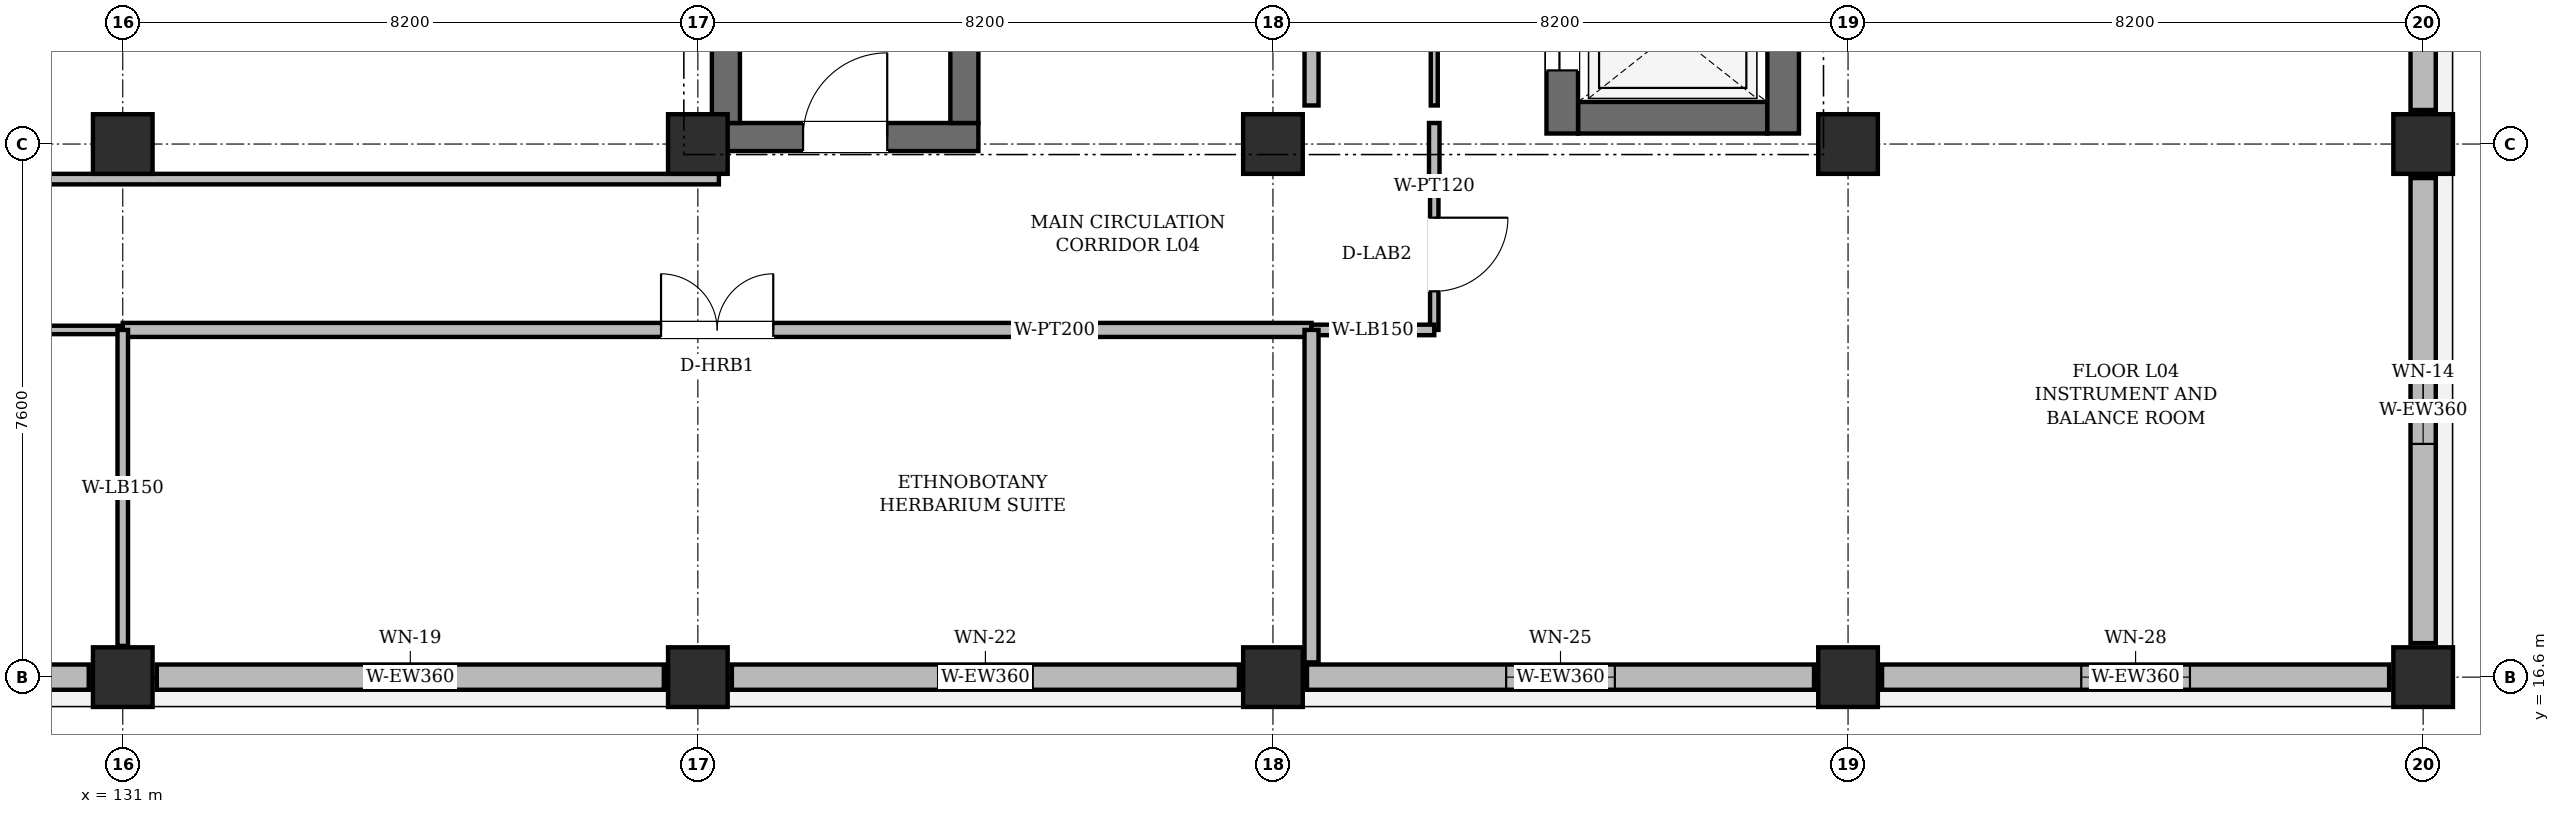
"""IFC4 building model, lengths in metres.
Left out: names, types, materials, properties, quantities, classifications, styles, units other than length and angle.
Written with IfcOpenShell. Run it as: python <this file> out.ifc"""

import sys

from ifc_helpers import new_model, si_unit, direction, frame, frame_2d, origin, origin_2d, place, context, subcontext, project, spatial, rectangle, extrude, element, fill, save


model = new_model("IFC4")
c1 = context("Model", 3, precision=1e-05, world=origin(), true_north=direction((0.0, 1.0)))
c2 = subcontext(c1, "Body", "Model", "MODEL_VIEW")
j1 = project(units=[si_unit("LENGTHUNIT", "METRE"), si_unit("PLANEANGLEUNIT", "RADIAN")], contexts=[c1])
p1 = place(None, origin())
s1 = spatial("IfcSite", under=j1, at=p1, CompositionType="ELEMENT")
p2 = place(p1, origin())
s2 = spatial("IfcBuilding", under=s1, at=p2, CompositionType="ELEMENT")
p3 = place(p2, frame((0.0, 0.0, 19.8)))
s3 = spatial("IfcBuildingStorey", under=s2, at=p3, CompositionType="ELEMENT", Elevation=19.8)
for number, where, z_axis, x_axis in (
    (1, (131.0, 16.6, 0.0), (0.0, 0.0, 1.0), (1.0, 0.0, 0.0)),
    (2, (131.0, 24.2, 0.0), (0.0, 0.0, 1.0), (1.0, 0.0, 0.0)),
    (3, (139.2, 16.6, 0.0), (0.0, 0.0, 1.0), (1.0, 0.0, 0.0)),
    (4, (139.2, 24.2, 0.0), (0.0, 0.0, 1.0), (1.0, 0.0, 0.0)),
    (5, (147.4, 16.6, 0.0), (0.0, 0.0, 1.0), (1.0, 0.0, 0.0)),
    (6, (147.4, 24.2, 0.0), (0.0, 0.0, 1.0), (1.0, 0.0, 0.0)),
    (7, (155.6, 16.6, 0.0), (0.0, 0.0, 1.0), (1.0, 0.0, 0.0)),
    (8, (155.6, 24.2, 0.0), (0.0, 0.0, 1.0), (1.0, 0.0, 0.0)),
    (9, (163.8, 16.6, 0.0), (0.0, 0.0, 1.0), (1.0, 0.0, 0.0)),
    (10, (163.8, 24.2, 0.0), (0.0, 0.0, 1.0), (1.0, 0.0, 0.0)),
):
    element("IfcColumn", number, at=place(p3, frame(where, z_axis=z_axis, x_axis=x_axis)), inside=s3, PredefinedType="COLUMN", context=c2, shape_type="SweptSolid", body=[
        extrude(rectangle(XDim=0.85, YDim=0.85, at=origin_2d()), origin(), (0.0, 0.0, 1.0), 3.94),
    ])
p4 = place(p3, frame((123.285, 16.6, 0.0), z_axis=(0.0, 0.0, 1.0), x_axis=(1.0, 0.0, 0.0)))
e11 = element("IfcWall", 11, at=p4, inside=s3, PredefinedType="SOLIDWALL", context=c2, shape_type="SweptSolid", body=[
    extrude(rectangle(XDim=7.23, YDim=0.36, at=frame_2d((3.615, 0.0))), origin(), (0.0, 0.0, 1.0), 3.325),
])
p5 = place(p4, frame((3.14, 0.0, 0.95)))
e12 = element("IfcOpeningElement", 12, at=p5, cuts=e11, PredefinedType="OPENING", context=c2, shape_type="SweptSolid", body=[
    extrude(rectangle(XDim=0.95, YDim=2.05, at=frame_2d((0.475, 1.025))), frame((0.0, 0.192, 0.0), z_axis=(0.0, -1.0, 0.0), x_axis=(1.0, 0.0, 0.0)), (0.0, 0.0, 1.0), 0.384),
])
p6 = place(p3, frame((131.485, 16.6, 0.0), z_axis=(0.0, 0.0, 1.0), x_axis=(1.0, 0.0, 0.0)))
e13 = element("IfcWall", 13, at=p6, inside=s3, PredefinedType="SOLIDWALL", context=c2, shape_type="SweptSolid", body=[
    extrude(rectangle(XDim=7.23, YDim=0.36, at=frame_2d((3.615, 0.0))), origin(), (0.0, 0.0, 1.0), 3.325),
])
p7 = place(p6, frame((3.04, 0.0, 0.95)))
e14 = element("IfcOpeningElement", 14, at=p7, cuts=e13, PredefinedType="OPENING", context=c2, shape_type="SweptSolid", body=[
    extrude(rectangle(XDim=1.15, YDim=1.75, at=frame_2d((0.575, 0.875))), frame((0.0, 0.192, 0.0), z_axis=(0.0, -1.0, 0.0), x_axis=(1.0, 0.0, 0.0)), (0.0, 0.0, 1.0), 0.384),
])
p8 = place(p3, frame((139.685, 16.6, 0.0), z_axis=(0.0, 0.0, 1.0), x_axis=(1.0, 0.0, 0.0)))
e15 = element("IfcWall", 15, at=p8, inside=s3, PredefinedType="SOLIDWALL", context=c2, shape_type="SweptSolid", body=[
    extrude(rectangle(XDim=7.23, YDim=0.36, at=frame_2d((3.615, 0.0))), origin(), (0.0, 0.0, 1.0), 3.325),
])
p9 = place(p8, frame((2.94, 0.0, 0.95)))
e16 = element("IfcOpeningElement", 16, at=p9, cuts=e15, PredefinedType="OPENING", context=c2, shape_type="SweptSolid", body=[
    extrude(rectangle(XDim=1.35, YDim=1.5, at=frame_2d((0.675, 0.75))), frame((0.0, 0.192, 0.0), z_axis=(0.0, -1.0, 0.0), x_axis=(1.0, 0.0, 0.0)), (0.0, 0.0, 1.0), 0.384),
])
p10 = place(p3, frame((147.885, 16.6, 0.0), z_axis=(0.0, 0.0, 1.0), x_axis=(1.0, 0.0, 0.0)))
e17 = element("IfcWall", 17, at=p10, inside=s3, PredefinedType="SOLIDWALL", context=c2, shape_type="SweptSolid", body=[
    extrude(rectangle(XDim=7.23, YDim=0.36, at=frame_2d((3.615, 0.0))), origin(), (0.0, 0.0, 1.0), 3.325),
])
p11 = place(p10, frame((2.84, 0.0, 0.95)))
e18 = element("IfcOpeningElement", 18, at=p11, cuts=e17, PredefinedType="OPENING", context=c2, shape_type="SweptSolid", body=[
    extrude(rectangle(XDim=1.55, YDim=1.25, at=frame_2d((0.775, 0.625))), frame((0.0, 0.192, 0.0), z_axis=(0.0, -1.0, 0.0), x_axis=(1.0, 0.0, 0.0)), (0.0, 0.0, 1.0), 0.384),
])
p12 = place(p3, frame((156.085, 16.6, 0.0), z_axis=(0.0, 0.0, 1.0), x_axis=(1.0, 0.0, 0.0)))
e19 = element("IfcWall", 19, at=p12, inside=s3, PredefinedType="SOLIDWALL", context=c2, shape_type="SweptSolid", body=[
    extrude(rectangle(XDim=7.23, YDim=0.36, at=frame_2d((3.615, 0.0))), origin(), (0.0, 0.0, 1.0), 3.325),
])
p13 = place(p12, frame((2.84, 0.0, 0.95)))
e20 = element("IfcOpeningElement", 20, at=p13, cuts=e19, PredefinedType="OPENING", context=c2, shape_type="SweptSolid", body=[
    extrude(rectangle(XDim=1.55, YDim=2.05, at=frame_2d((0.775, 1.025))), frame((0.0, 0.192, 0.0), z_axis=(0.0, -1.0, 0.0), x_axis=(1.0, 0.0, 0.0)), (0.0, 0.0, 1.0), 0.384),
])
p14 = place(p3, frame((163.8, 17.085, 0.0), z_axis=(0.0, 0.0, 1.0), x_axis=(0.0, 1.0, 0.0)))
e21 = element("IfcWall", 21, at=p14, inside=s3, PredefinedType="SOLIDWALL", context=c2, shape_type="SweptSolid", body=[
    extrude(rectangle(XDim=6.63, YDim=0.36, at=frame_2d((3.315, 0.0))), origin(), (0.0, 0.0, 1.0), 3.325),
])
p15 = place(p14, frame((2.84, 0.0, 0.95)))
e22 = element("IfcOpeningElement", 22, at=p15, cuts=e21, PredefinedType="OPENING", context=c2, shape_type="SweptSolid", body=[
    extrude(rectangle(XDim=0.95, YDim=1.5, at=frame_2d((0.475, 0.75))), frame((0.0, 0.192, 0.0), z_axis=(0.0, -1.0, 0.0), x_axis=(1.0, 0.0, 0.0)), (0.0, 0.0, 1.0), 0.384),
])
p16 = place(p3, frame((163.8, 24.685, 0.0), z_axis=(0.0, 0.0, 1.0), x_axis=(0.0, 1.0, 0.0)))
e23 = element("IfcWall", 23, at=p16, inside=s3, PredefinedType="SOLIDWALL", context=c2, shape_type="SweptSolid", body=[
    extrude(rectangle(XDim=6.63, YDim=0.36, at=frame_2d((3.315, 0.0))), origin(), (0.0, 0.0, 1.0), 3.325),
])
p17 = place(p16, frame((2.74, 0.0, 0.95)))
e24 = element("IfcOpeningElement", 24, at=p17, cuts=e23, PredefinedType="OPENING", context=c2, shape_type="SweptSolid", body=[
    extrude(rectangle(XDim=1.15, YDim=1.25, at=frame_2d((0.575, 0.625))), frame((0.0, 0.192, 0.0), z_axis=(0.0, -1.0, 0.0), x_axis=(1.0, 0.0, 0.0)), (0.0, 0.0, 1.0), 0.384),
])
p18 = place(p3, frame((139.4, 24.3, 0.0), z_axis=(0.0, 0.0, 1.0), x_axis=(1.0, 0.0, 0.0)))
e25 = element("IfcWall", 25, at=p18, inside=s3, PredefinedType="SHEAR", context=c2, shape_type="SweptSolid", body=[
    extrude(rectangle(XDim=3.8, YDim=0.4, at=frame_2d((1.9, 0.0))), origin(), (0.0, 0.0, 1.0), 3.94),
])
p19 = place(p18, frame((1.3, 0.0, 0.0)))
e26 = element("IfcOpeningElement", 26, at=p19, cuts=e25, PredefinedType="OPENING", context=c2, shape_type="SweptSolid", body=[
    extrude(rectangle(XDim=1.2, YDim=2.2, at=frame_2d((0.6, 1.1))), frame((0.0, 0.212, 0.0), z_axis=(0.0, -1.0, 0.0), x_axis=(1.0, 0.0, 0.0)), (0.0, 0.0, 1.0), 0.424),
])
for number, where, z_axis, x_axis in (
    (27, (139.6, 24.5, 0.0), (0.0, 0.0, 1.0), (0.0, 1.0, 0.0)),
    (28, (143.0, 24.5, 0.0), (0.0, 0.0, 1.0), (0.0, 1.0, 0.0)),
):
    element("IfcWall", number, at=place(p3, frame(where, z_axis=z_axis, x_axis=x_axis)), inside=s3, PredefinedType="SHEAR", context=c2, shape_type="SweptSolid", body=[
        extrude(rectangle(XDim=7.0, YDim=0.4, at=frame_2d((3.5, 0.0))), origin(), (0.0, 0.0, 1.0), 3.94),
    ])
p20 = place(p3, frame((151.75, 24.575, 0.0), z_axis=(0.0, 0.0, 1.0), x_axis=(1.0, 0.0, 0.0)))
e29 = element("IfcWall", 29, at=p20, inside=s3, PredefinedType="SHEAR", context=c2, shape_type="SweptSolid", body=[
    extrude(rectangle(XDim=2.7, YDim=0.45, at=frame_2d((1.35, 0.0))), origin(), (0.0, 0.0, 1.0), 3.94),
])
p21 = place(p3, frame((151.525, 24.35, 0.0), z_axis=(0.0, 0.0, 1.0), x_axis=(0.0, 1.0, 0.0)))
e30 = element("IfcWall", 30, at=p21, inside=s3, PredefinedType="SHEAR", context=c2, shape_type="SweptSolid", body=[
    extrude(rectangle(XDim=2.9, YDim=0.45, at=frame_2d((1.45, 0.0))), origin(), (0.0, 0.0, 1.0), 3.94),
])
p22 = place(p21, frame((0.9, 0.0, 0.0)))
e31 = element("IfcOpeningElement", 31, at=p22, cuts=e30, PredefinedType="OPENING", context=c2, shape_type="SweptSolid", body=[
    extrude(rectangle(XDim=1.1, YDim=2.2, at=frame_2d((0.55, 1.1))), frame((0.0, 0.237, 0.0), z_axis=(0.0, -1.0, 0.0), x_axis=(1.0, 0.0, 0.0)), (0.0, 0.0, 1.0), 0.474),
])
p23 = place(p3, frame((154.675, 24.35, 0.0), z_axis=(0.0, 0.0, 1.0), x_axis=(0.0, 1.0, 0.0)))
e32 = element("IfcWall", 32, at=p23, inside=s3, PredefinedType="SHEAR", context=c2, shape_type="SweptSolid", body=[
    extrude(rectangle(XDim=2.9, YDim=0.45, at=frame_2d((1.45, 0.0))), origin(), (0.0, 0.0, 1.0), 3.94),
])
p24 = place(p3, frame((147.95, 31.75, 0.0), z_axis=(0.0, 0.0, 1.0), x_axis=(0.0, -1.0, 0.0)))
e33 = element("IfcWall", 33, at=p24, inside=s3, PredefinedType="PARTITIONING", context=c2, shape_type="SweptSolid", body=[
    extrude(rectangle(XDim=7.0, YDim=0.2, at=frame_2d((3.5, 0.0))), origin(), (0.0, 0.0, 1.0), 3.805),
])
p25 = place(p24, frame((2.75, 0.0, 0.0)))
e34 = element("IfcOpeningElement", 34, at=p25, cuts=e33, PredefinedType="OPENING", context=c2, shape_type="SweptSolid", body=[
    extrude(rectangle(XDim=1.5, YDim=2.2, at=frame_2d((0.75, 1.1))), frame((0.0, 0.112, 0.0), z_axis=(0.0, -1.0, 0.0), x_axis=(1.0, 0.0, 0.0)), (0.0, 0.0, 1.0), 0.224),
])
p26 = place(p3, frame((149.7, 24.75, 0.0), z_axis=(0.0, 0.0, 1.0), x_axis=(0.0, 1.0, 0.0)))
e35 = element("IfcWall", 35, at=p26, inside=s3, PredefinedType="PARTITIONING", context=c2, shape_type="SweptSolid", body=[
    extrude(rectangle(XDim=11.3, YDim=0.1, at=frame_2d((5.65, 0.0))), origin(), (0.0, 0.0, 1.0), 3.805),
])
p27 = place(p26, frame((4.75, 0.0, 0.0)))
e36 = element("IfcOpeningElement", 36, at=p27, cuts=e35, PredefinedType="OPENING", context=c2, shape_type="SweptSolid", body=[
    extrude(rectangle(XDim=1.8, YDim=2.4, at=frame_2d((0.9, 1.2))), frame((0.0, 0.062, 0.0), z_axis=(0.0, -1.0, 0.0), x_axis=(1.0, 0.0, 0.0)), (0.0, 0.0, 1.0), 0.124),
])
p28 = place(p3, frame((131.0, 21.55, 0.0), z_axis=(0.0, 0.0, 1.0), x_axis=(-1.0, 0.0, 0.0)))
e37 = element("IfcWall", 37, at=p28, inside=s3, PredefinedType="PARTITIONING", context=c2, shape_type="SweptSolid", body=[
    extrude(rectangle(XDim=16.0, YDim=0.12, at=frame_2d((8.0, 0.0))), origin(), (0.0, 0.0, 1.0), 3.615),
])
p29 = place(p28, frame((7.475, 0.0, 0.0)))
e38 = element("IfcOpeningElement", 38, at=p29, cuts=e37, PredefinedType="OPENING", context=c2, shape_type="SweptSolid", body=[
    extrude(rectangle(XDim=1.05, YDim=2.2, at=frame_2d((0.525, 1.1))), frame((0.0, 0.072, 0.0), z_axis=(0.0, -1.0, 0.0), x_axis=(1.0, 0.0, 0.0)), (0.0, 0.0, 1.0), 0.144),
])
p30 = place(p3, frame((147.95, 21.55, 0.0), z_axis=(0.0, 0.0, 1.0), x_axis=(-1.0, 0.0, 0.0)))
e39 = element("IfcWall", 39, at=p30, inside=s3, PredefinedType="PARTITIONING", context=c2, shape_type="SweptSolid", body=[
    extrude(rectangle(XDim=16.95, YDim=0.2, at=frame_2d((8.475, 0.0))), origin(), (0.0, 0.0, 1.0), 3.515),
])
p31 = place(p30, frame((7.675, 0.0, 0.0)))
e40 = element("IfcOpeningElement", 40, at=p31, cuts=e39, PredefinedType="OPENING", context=c2, shape_type="SweptSolid", body=[
    extrude(rectangle(XDim=1.6, YDim=2.3, at=frame_2d((0.8, 1.15))), frame((0.0, 0.112, 0.0), z_axis=(0.0, -1.0, 0.0), x_axis=(1.0, 0.0, 0.0)), (0.0, 0.0, 1.0), 0.224),
])
p32 = place(p3, frame((149.7, 24.5, 0.0), z_axis=(0.0, 0.0, 1.0), x_axis=(0.0, -1.0, 0.0)))
e41 = element("IfcWall", 41, at=p32, inside=s3, PredefinedType="PARTITIONING", context=c2, shape_type="SweptSolid", body=[
    extrude(rectangle(XDim=0.8, YDim=0.15, at=frame_2d((0.4, 0.0))), origin(), (0.0, 0.0, 1.0), 3.805),
])
p33 = place(p3, frame((149.7, 23.7, 0.0), z_axis=(0.0, 0.0, 1.0), x_axis=(0.0, -1.0, 0.0)))
e42 = element("IfcWall", 42, at=p33, inside=s3, PredefinedType="PARTITIONING", context=c2, shape_type="SweptSolid", body=[
    extrude(rectangle(XDim=2.15, YDim=0.12, at=frame_2d((1.075, 0.0))), origin(), (0.0, 0.0, 1.0), 3.805),
])
p34 = place(p33, frame((0.55, 0.0, 0.0)))
e43 = element("IfcOpeningElement", 43, at=p34, cuts=e42, PredefinedType="OPENING", context=c2, shape_type="SweptSolid", body=[
    extrude(rectangle(XDim=1.05, YDim=2.2, at=frame_2d((0.525, 1.1))), frame((0.0, 0.072, 0.0), z_axis=(0.0, -1.0, 0.0), x_axis=(1.0, 0.0, 0.0)), (0.0, 0.0, 1.0), 0.144),
])
p35 = place(p3, frame((149.7, 21.55, 0.0), z_axis=(0.0, 0.0, 1.0), x_axis=(-1.0, 0.0, 0.0)))
e44 = element("IfcWall", 44, at=p35, inside=s3, PredefinedType="PARTITIONING", context=c2, shape_type="SweptSolid", body=[
    extrude(rectangle(XDim=1.75, YDim=0.15, at=frame_2d((0.875, 0.0))), origin(), (0.0, 0.0, 1.0), 3.515),
])
p36 = place(p3, frame((115.0, 23.7, 0.0), z_axis=(0.0, 0.0, 1.0), x_axis=(1.0, 0.0, 0.0)))
e45 = element("IfcWall", 45, at=p36, inside=s3, PredefinedType="PARTITIONING", context=c2, shape_type="SweptSolid", body=[
    extrude(rectangle(XDim=24.5, YDim=0.15, at=frame_2d((12.25, 0.0))), origin(), (0.0, 0.0, 1.0), 3.805),
])
p37 = place(p36, frame((11.55, 0.0, 0.0)))
e46 = element("IfcOpeningElement", 46, at=p37, cuts=e45, PredefinedType="OPENING", context=c2, shape_type="SweptSolid", body=[
    extrude(rectangle(XDim=1.4, YDim=2.2, at=frame_2d((0.7, 1.1))), frame((0.0, 0.087, 0.0), z_axis=(0.0, -1.0, 0.0), x_axis=(1.0, 0.0, 0.0)), (0.0, 0.0, 1.0), 0.174),
])
p38 = place(p3, frame((131.0, 21.55, 0.0), z_axis=(0.0, 0.0, 1.0), x_axis=(0.0, -1.0, 0.0)))
e47 = element("IfcWall", 47, at=p38, inside=s3, PredefinedType="PARTITIONING", context=c2, shape_type="SweptSolid", body=[
    extrude(rectangle(XDim=4.505, YDim=0.15, at=frame_2d((2.252, 0.0))), origin(), (0.0, 0.0, 1.0), 3.275),
])
p39 = place(p3, frame((147.95, 21.55, 0.0), z_axis=(0.0, 0.0, 1.0), x_axis=(0.0, -1.0, 0.0)))
e48 = element("IfcWall", 48, at=p39, inside=s3, PredefinedType="PARTITIONING", context=c2, shape_type="SweptSolid", body=[
    extrude(rectangle(XDim=4.74, YDim=0.2, at=frame_2d((2.37, 0.0))), origin(), (0.0, 0.0, 1.0), 3.805),
])
p40 = place(p7, origin())
e49 = element("IfcWindow", 49, at=p40, inside=s3, PartitioningType="SINGLE_PANEL", PredefinedType="WINDOW", context=c2, shape_type="SweptSolid", body=[
    extrude(rectangle(XDim=1.15, YDim=1.75, at=frame_2d((0.575, 0.875))), frame((0.0, 0.03, 0.0), z_axis=(0.0, -1.0, 0.0), x_axis=(1.0, 0.0, 0.0)), (0.0, 0.0, 1.0), 0.06),
])
fill(e14, e49)
p41 = place(p9, origin())
e50 = element("IfcWindow", 50, at=p41, inside=s3, PartitioningType="SINGLE_PANEL", PredefinedType="WINDOW", context=c2, shape_type="SweptSolid", body=[
    extrude(rectangle(XDim=1.35, YDim=1.5, at=frame_2d((0.675, 0.75))), frame((0.0, 0.03, 0.0), z_axis=(0.0, -1.0, 0.0), x_axis=(1.0, 0.0, 0.0)), (0.0, 0.0, 1.0), 0.06),
])
fill(e16, e50)
p42 = place(p11, origin())
e51 = element("IfcWindow", 51, at=p42, inside=s3, PartitioningType="DOUBLE_PANEL_VERTICAL", PredefinedType="WINDOW", context=c2, shape_type="SweptSolid", body=[
    extrude(rectangle(XDim=1.55, YDim=1.25, at=frame_2d((0.775, 0.625))), frame((0.0, 0.03, 0.0), z_axis=(0.0, -1.0, 0.0), x_axis=(1.0, 0.0, 0.0)), (0.0, 0.0, 1.0), 0.06),
])
fill(e18, e51)
p43 = place(p13, origin())
e52 = element("IfcWindow", 52, at=p43, inside=s3, PartitioningType="DOUBLE_PANEL_VERTICAL", PredefinedType="WINDOW", context=c2, shape_type="SweptSolid", body=[
    extrude(rectangle(XDim=1.55, YDim=2.05, at=frame_2d((0.775, 1.025))), frame((0.0, 0.03, 0.0), z_axis=(0.0, -1.0, 0.0), x_axis=(1.0, 0.0, 0.0)), (0.0, 0.0, 1.0), 0.06),
])
fill(e20, e52)
p44 = place(p15, origin())
e53 = element("IfcWindow", 53, at=p44, inside=s3, PartitioningType="SINGLE_PANEL", PredefinedType="WINDOW", context=c2, shape_type="SweptSolid", body=[
    extrude(rectangle(XDim=0.95, YDim=1.5, at=frame_2d((0.475, 0.75))), frame((0.0, 0.03, 0.0), z_axis=(0.0, -1.0, 0.0), x_axis=(1.0, 0.0, 0.0)), (0.0, 0.0, 1.0), 0.06),
])
fill(e22, e53)
p45 = place(p19, origin())
e54 = element("IfcDoor", 54, at=p45, inside=s3, OperationType="SINGLE_SWING_RIGHT", PredefinedType="DOOR", context=c2, shape_type="SweptSolid", body=[
    extrude(rectangle(XDim=1.2, YDim=2.2, at=frame_2d((0.6, 1.1))), frame((0.0, 0.025, 0.0), z_axis=(0.0, -1.0, 0.0), x_axis=(1.0, 0.0, 0.0)), (0.0, 0.0, 1.0), 0.05),
])
fill(e26, e54)
p46 = place(p22, origin())
e55 = element("IfcDoor", 55, at=p46, inside=s3, OperationType="DOUBLE_DOOR_SLIDING", PredefinedType="DOOR", context=c2, shape_type="SweptSolid", body=[
    extrude(rectangle(XDim=1.1, YDim=2.2, at=frame_2d((0.55, 1.1))), frame((0.0, 0.025, 0.0), z_axis=(0.0, -1.0, 0.0), x_axis=(1.0, 0.0, 0.0)), (0.0, 0.0, 1.0), 0.05),
])
fill(e31, e55)
p47 = place(p31, frame((1.6, 0.0, 0.0), z_axis=(0.0, 0.0, 1.0), x_axis=(-1.0, 0.0, 0.0)))
e56 = element("IfcDoor", 56, at=p47, inside=s3, OperationType="DOUBLE_DOOR_SINGLE_SWING", PredefinedType="DOOR", context=c2, shape_type="SweptSolid", body=[
    extrude(rectangle(XDim=1.6, YDim=2.3, at=frame_2d((0.8, 1.15))), frame((0.0, 0.025, 0.0), z_axis=(0.0, -1.0, 0.0), x_axis=(1.0, 0.0, 0.0)), (0.0, 0.0, 1.0), 0.05),
])
fill(e40, e56)
p48 = place(p34, origin())
e57 = element("IfcDoor", 57, at=p48, inside=s3, OperationType="SINGLE_SWING_LEFT", PredefinedType="DOOR", context=c2, shape_type="SweptSolid", body=[
    extrude(rectangle(XDim=1.05, YDim=2.2, at=frame_2d((0.525, 1.1))), frame((0.0, 0.025, 0.0), z_axis=(0.0, -1.0, 0.0), x_axis=(1.0, 0.0, 0.0)), (0.0, 0.0, 1.0), 0.05),
])
fill(e43, e57)
save(model, sys.argv[1])
